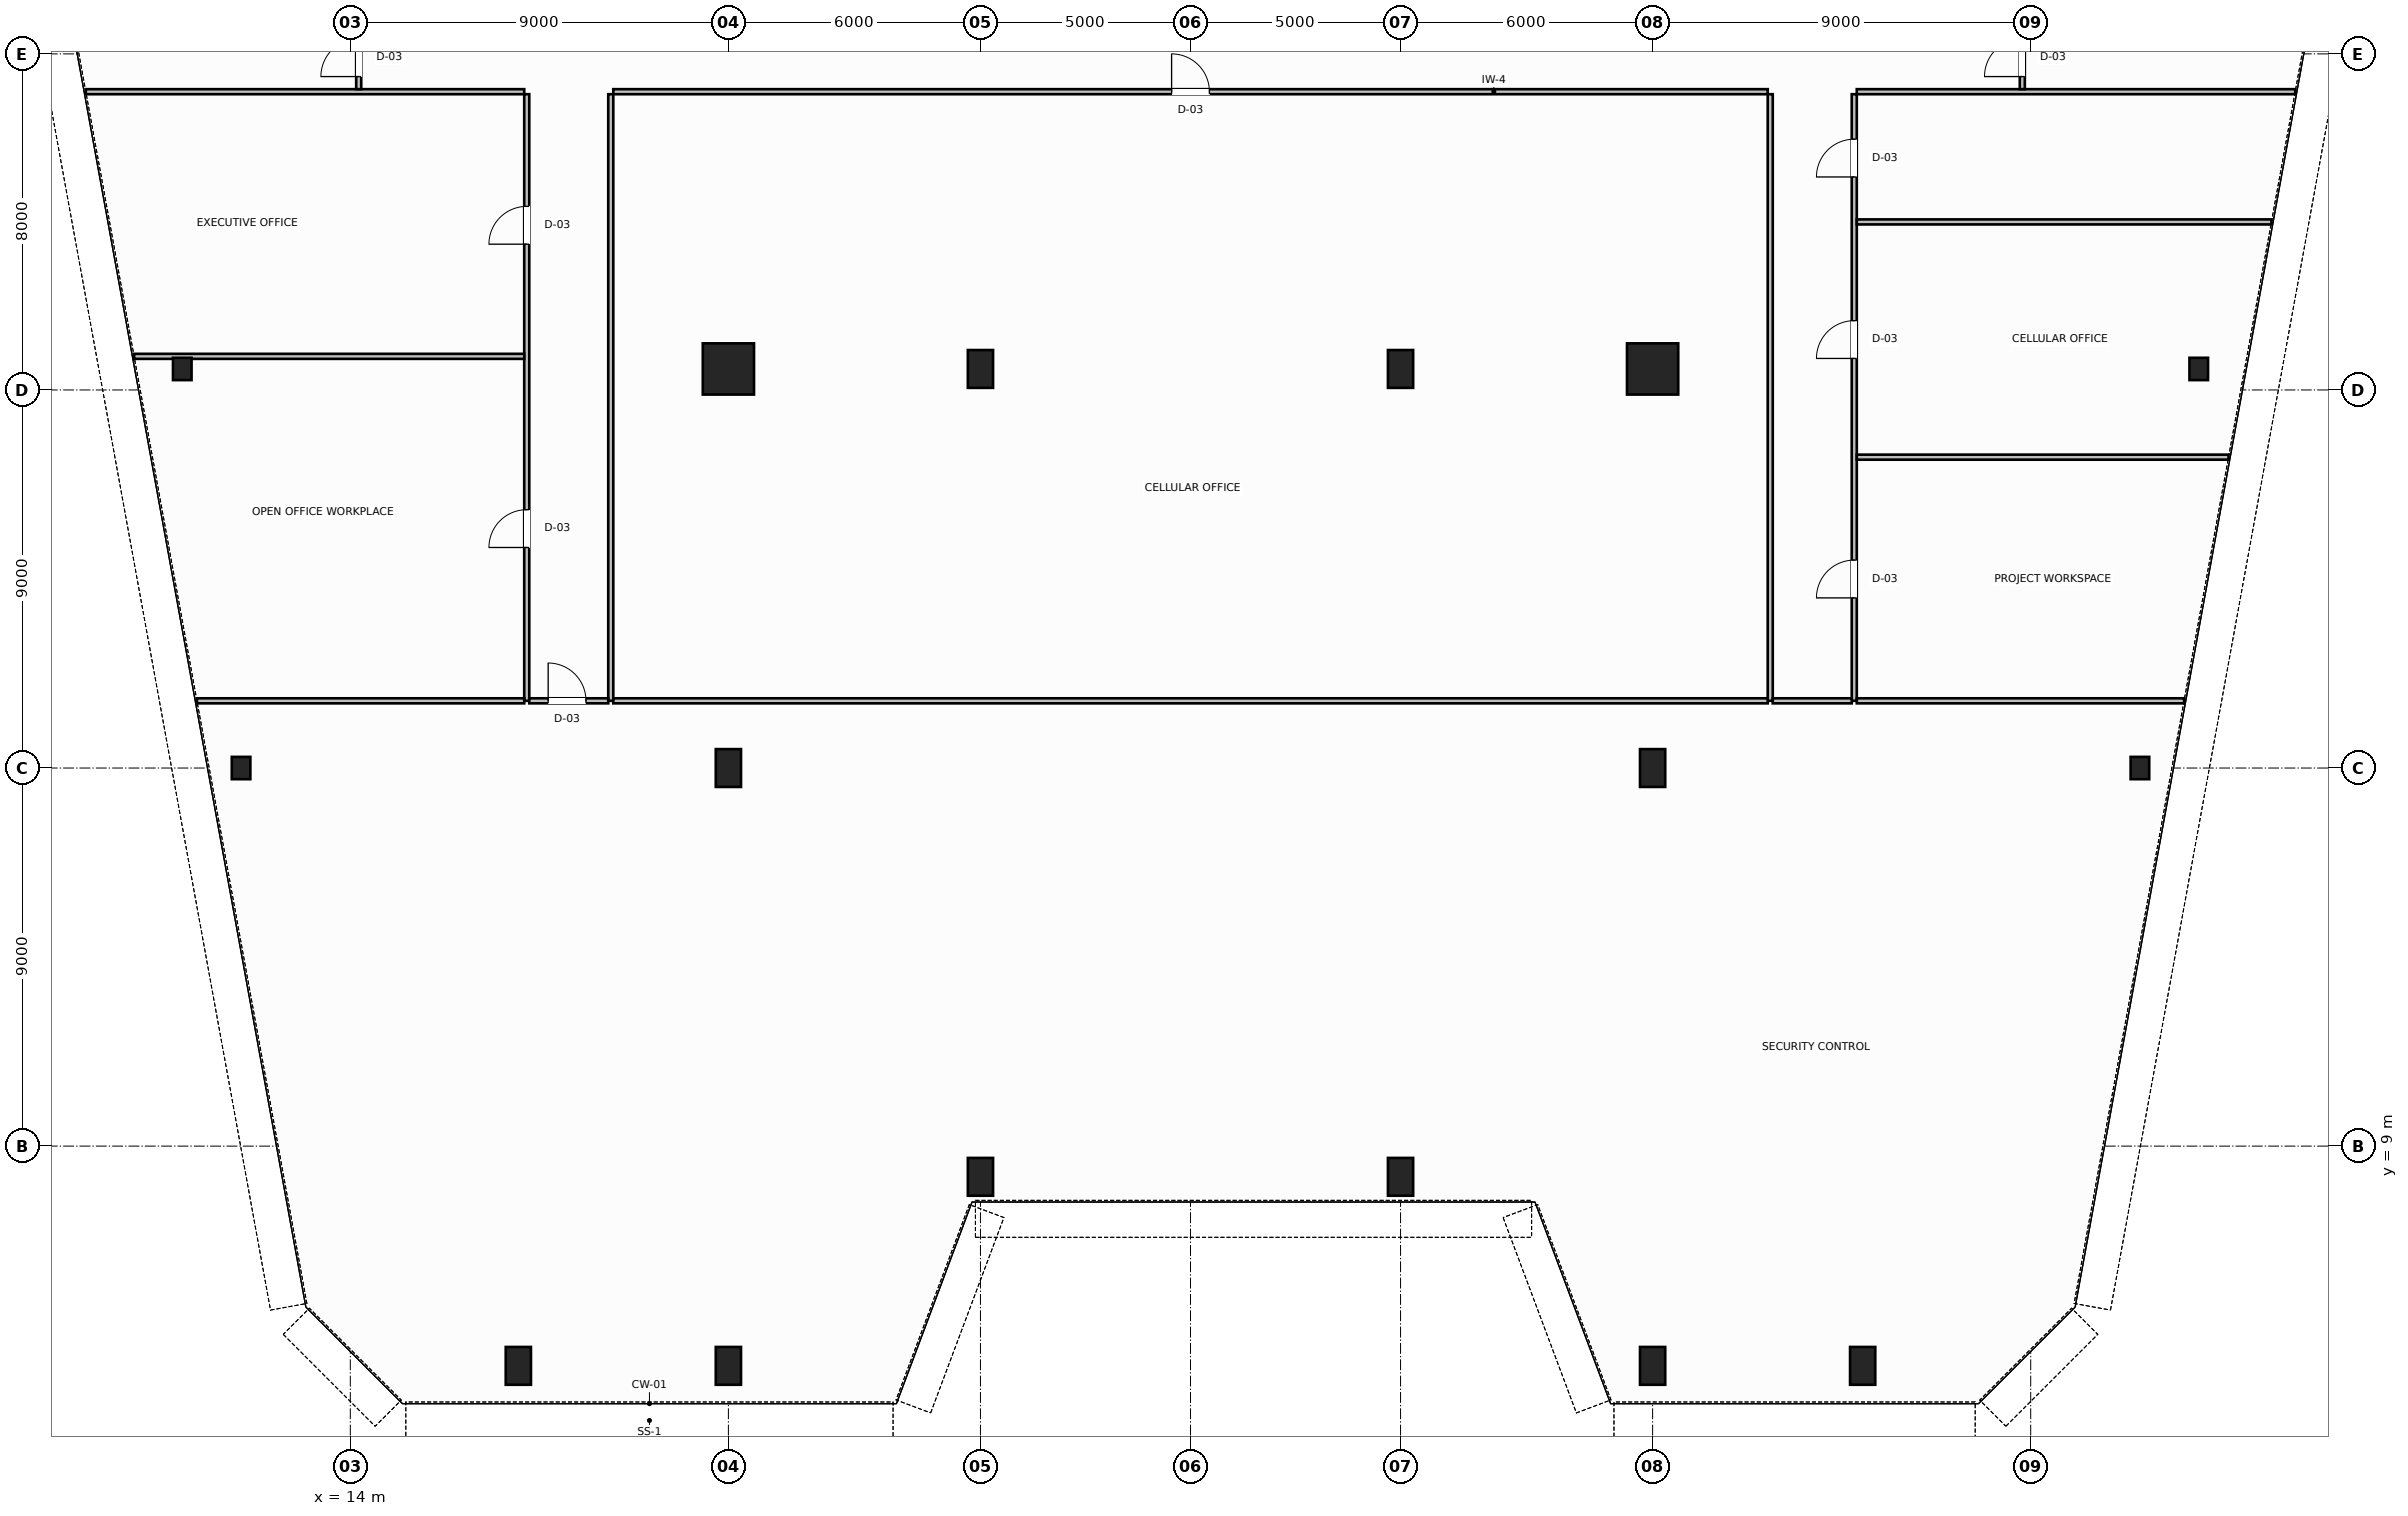
"""IFC4 building model, lengths in metres.
Left out: names, types, materials, properties, quantities, classifications, styles, units other than length and angle.
Written with IfcOpenShell. Run it as: python <this file> out.ifc"""

import sys

from ifc_helpers import new_model, si_unit, direction, frame, frame_2d, origin, origin_2d, place, context, subcontext, project, spatial, rectangle, hollow_rectangle, hollow_circle, i_section, extrude, source, transform, mapped, element, fill, save


model = new_model("IFC4")
c1 = context("Model", 3, precision=1e-05, world=origin(), true_north=direction((0.0, 1.0)))
c2 = subcontext(c1, "Body", "Model", "MODEL_VIEW")
j1 = project(units=[si_unit("LENGTHUNIT", "METRE"), si_unit("PLANEANGLEUNIT", "RADIAN")], contexts=[c1])
p1 = place(None, origin())
s1 = spatial("IfcSite", under=j1, at=p1, CompositionType="ELEMENT")
p2 = place(p1, origin())
s2 = spatial("IfcBuilding", under=s1, at=p2, CompositionType="ELEMENT")
p3 = place(p2, frame((0.0, 0.0, 64.4)))
s3 = spatial("IfcBuildingStorey", under=s2, at=p3, CompositionType="ELEMENT", Elevation=64.4)
m1 = source(origin(), c2, "Body", "SweptSolid", [
    extrude(i_section(OverallWidth=0.442, OverallDepth=0.531, WebThickness=0.065, FlangeThickness=0.076, FilletRadius=0.015, at=origin_2d()), origin(), (0.0, 0.0, 1.0), 3.8),
])
for number, where, z_axis, x_axis in (
    (1, (10.0, 27.5, 0.0), (0.0, 0.0, 1.0), (1.0, 0.0, 0.0)),
    (2, (11.4, 18.0, 0.0), (0.0, 0.0, 1.0), (1.0, 0.0, 0.0)),
    (3, (58.0, 27.5, 0.0), (0.0, 0.0, 1.0), (1.0, 0.0, 0.0)),
    (4, (56.6, 18.0, 0.0), (0.0, 0.0, 1.0), (1.0, 0.0, 0.0)),
):
    element("IfcColumn", number, at=place(p3, frame(where, z_axis=z_axis, x_axis=x_axis)), inside=s3, PredefinedType="COLUMN", context=c2, shape_type="MappedRepresentation", body=[
        mapped(m1, transform((0.0, 0.0, 0.0), scale=1.0)),
    ])
m2 = source(origin(), c2, "Body", "SweptSolid", [
    extrude(hollow_circle(Radius=0.61, WallThickness=0.05, at=origin_2d()), origin(), (0.0, 0.0, 1.0), 3.8),
])
p4 = place(p3, frame((23.0, 27.5, 0.0), z_axis=(0.0, 0.0, 1.0), x_axis=(1.0, 0.0, 0.0)))
e5 = element("IfcColumn", 5, at=p4, inside=s3, PredefinedType="COLUMN", context=c2, shape_type="MappedRepresentation", body=[
    mapped(m2, transform((0.0, 0.0, 0.0), scale=1.0)),
])
m3 = source(origin(), c2, "Body", "SweptSolid", [
    extrude(hollow_rectangle(XDim=0.6, YDim=0.9, WallThickness=0.04, InnerFilletRadius=0.04, OuterFilletRadius=0.08, at=origin_2d()), origin(), (0.0, 0.0, 1.0), 3.8),
])
for number, where, z_axis, x_axis in (
    (6, (29.0, 27.5, 0.0), (0.0, 0.0, 1.0), (1.0, 0.0, 0.0)),
    (7, (39.0, 27.5, 0.0), (0.0, 0.0, 1.0), (1.0, 0.0, 0.0)),
):
    element("IfcColumn", number, at=place(p3, frame(where, z_axis=z_axis, x_axis=x_axis)), inside=s3, PredefinedType="COLUMN", context=c2, shape_type="MappedRepresentation", body=[
        mapped(m3, transform((0.0, 0.0, 0.0), scale=1.0)),
    ])
p5 = place(p3, frame((45.0, 27.5, 0.0), z_axis=(0.0, 0.0, 1.0), x_axis=(1.0, 0.0, 0.0)))
e8 = element("IfcColumn", 8, at=p5, inside=s3, PredefinedType="COLUMN", context=c2, shape_type="MappedRepresentation", body=[
    mapped(m2, transform((0.0, 0.0, 0.0), scale=1.0)),
])
for number, where, z_axis, x_axis in (
    (9, (23.0, 18.0, 0.0), (0.0, 0.0, 1.0), (1.0, 0.0, 0.0)),
    (10, (45.0, 18.0, 0.0), (0.0, 0.0, 1.0), (1.0, 0.0, 0.0)),
):
    element("IfcColumn", number, at=place(p3, frame(where, z_axis=z_axis, x_axis=x_axis)), inside=s3, PredefinedType="COLUMN", context=c2, shape_type="MappedRepresentation", body=[
        mapped(m3, transform((0.0, 0.0, 0.0), scale=1.0)),
    ])
m4 = source(origin(), c2, "Body", "SweptSolid", [
    extrude(hollow_rectangle(XDim=0.6, YDim=0.9, WallThickness=0.04, InnerFilletRadius=0.04, OuterFilletRadius=0.08, at=origin_2d()), origin(), (0.0, 0.0, 1.0), 3.744),
])
for number, where, z_axis, x_axis in (
    (11, (18.0, 3.769, 0.032), (0.0, 0.064, 0.998), (-1.0, 0.0, 0.0)),
    (12, (23.0, 3.769, 0.032), (0.0, 0.064, 0.998), (-1.0, 0.0, 0.0)),
    (13, (29.0, 8.269, 0.032), (0.0, 0.064, 0.998), (-1.0, 0.0, 0.0)),
    (14, (39.0, 8.269, 0.032), (0.0, 0.064, 0.998), (-1.0, 0.0, 0.0)),
    (15, (45.0, 3.769, 0.032), (0.0, 0.064, 0.998), (-1.0, 0.0, 0.0)),
    (16, (50.0, 3.769, 0.032), (0.0, 0.064, 0.998), (-1.0, 0.0, 0.0)),
):
    element("IfcColumn", number, at=place(p3, frame(where, z_axis=z_axis, x_axis=x_axis)), inside=s3, PredefinedType="COLUMN", context=c2, shape_type="MappedRepresentation", body=[
        mapped(m4, transform((0.0, 0.0, 0.0), scale=1.0)),
    ])
p6 = place(p3, frame((20.26, 34.1, 0.0), z_axis=(0.0, 0.0, 1.0), x_axis=(1.0, 0.0, 0.0)))
e17 = element("IfcWall", 17, at=p6, inside=s3, PredefinedType="PARTITIONING", context=c2, shape_type="SweptSolid", body=[
    extrude(rectangle(XDim=27.48, YDim=0.12, at=frame_2d((13.74, 0.0))), origin(), (0.0, 0.0, 1.0), 3.58),
])
p7 = place(p6, frame((13.29, 0.0, 0.0)))
e18 = element("IfcOpeningElement", 18, at=p7, cuts=e17, PredefinedType="OPENING", context=c2, shape_type="SweptSolid", body=[
    extrude(rectangle(XDim=0.9, YDim=2.15, at=frame_2d((0.45, 1.075))), frame((0.0, 0.07, 0.0), z_axis=(0.0, -1.0, 0.0), x_axis=(1.0, 0.0, 0.0)), (0.0, 0.0, 1.0), 0.14),
])
for number, where, z_axis, x_axis in (
    (19, (7.704, 34.1, 0.0), (0.0, 0.0, 1.0), (1.0, 0.0, 0.0)),
    (20, (49.86, 34.1, 0.0), (0.0, 0.0, 1.0), (1.0, 0.0, 0.0)),
):
    element("IfcWall", number, at=place(p3, frame(where, z_axis=z_axis, x_axis=x_axis)), inside=s3, PredefinedType="PARTITIONING", context=c2, shape_type="SweptSolid", body=[
        extrude(rectangle(XDim=10.436, YDim=0.12, at=frame_2d((5.218, 0.0))), origin(), (0.0, 0.0, 1.0), 3.58),
    ])
p8 = place(p3, frame((14.2, 34.16, 0.0), z_axis=(0.0, 0.0, 1.0), x_axis=(0.0, 1.0, 0.0)))
e21 = element("IfcWall", 21, at=p8, inside=s3, PredefinedType="PARTITIONING", context=c2, shape_type="SweptSolid", body=[
    extrude(rectangle(XDim=2.28, YDim=0.12, at=frame_2d((1.14, 0.0))), origin(), (0.0, 0.0, 1.0), 3.58),
])
p9 = place(p8, frame((0.3, 0.0, 0.0)))
e22 = element("IfcOpeningElement", 22, at=p9, cuts=e21, PredefinedType="OPENING", context=c2, shape_type="SweptSolid", body=[
    extrude(rectangle(XDim=0.9, YDim=2.15, at=frame_2d((0.45, 1.075))), frame((0.0, 0.07, 0.0), z_axis=(0.0, -1.0, 0.0), x_axis=(1.0, 0.0, 0.0)), (0.0, 0.0, 1.0), 0.14),
])
p10 = place(p3, frame((53.8, 34.16, 0.0), z_axis=(0.0, 0.0, 1.0), x_axis=(0.0, 1.0, 0.0)))
e23 = element("IfcWall", 23, at=p10, inside=s3, PredefinedType="PARTITIONING", context=c2, shape_type="SweptSolid", body=[
    extrude(rectangle(XDim=2.28, YDim=0.12, at=frame_2d((1.14, 0.0))), origin(), (0.0, 0.0, 1.0), 3.58),
])
p11 = place(p10, frame((0.3, 0.0, 0.0)))
e24 = element("IfcOpeningElement", 24, at=p11, cuts=e23, PredefinedType="OPENING", context=c2, shape_type="SweptSolid", body=[
    extrude(rectangle(XDim=0.9, YDim=2.15, at=frame_2d((0.45, 1.075))), frame((0.0, 0.07, 0.0), z_axis=(0.0, -1.0, 0.0), x_axis=(1.0, 0.0, 0.0)), (0.0, 0.0, 1.0), 0.14),
])
p12 = place(p3, frame((18.2, 19.6, 0.0), z_axis=(0.0, 0.0, 1.0), x_axis=(0.0, 1.0, 0.0)))
e25 = element("IfcWall", 25, at=p12, inside=s3, PredefinedType="PARTITIONING", context=c2, shape_type="SweptSolid", body=[
    extrude(rectangle(XDim=14.44, YDim=0.12, at=frame_2d((7.22, 0.0))), origin(), (0.0, 0.0, 1.0), 3.58),
])
p13 = place(p12, frame((3.65, 0.0, 0.0)))
e26 = element("IfcOpeningElement", 26, at=p13, cuts=e25, PredefinedType="OPENING", context=c2, shape_type="SweptSolid", body=[
    extrude(rectangle(XDim=0.9, YDim=2.15, at=frame_2d((0.45, 1.075))), frame((0.0, 0.07, 0.0), z_axis=(0.0, -1.0, 0.0), x_axis=(1.0, 0.0, 0.0)), (0.0, 0.0, 1.0), 0.14),
])
p14 = place(p12, frame((10.87, 0.0, 0.0)))
e27 = element("IfcOpeningElement", 27, at=p14, cuts=e25, PredefinedType="OPENING", context=c2, shape_type="SweptSolid", body=[
    extrude(rectangle(XDim=0.9, YDim=2.15, at=frame_2d((0.45, 1.075))), frame((0.0, 0.07, 0.0), z_axis=(0.0, -1.0, 0.0), x_axis=(1.0, 0.0, 0.0)), (0.0, 0.0, 1.0), 0.14),
])
for number, where, z_axis, x_axis in (
    (28, (20.2, 19.6, 0.0), (0.0, 0.0, 1.0), (0.0, 1.0, 0.0)),
    (29, (47.8, 19.6, 0.0), (0.0, 0.0, 1.0), (0.0, 1.0, 0.0)),
):
    element("IfcWall", number, at=place(p3, frame(where, z_axis=z_axis, x_axis=x_axis)), inside=s3, PredefinedType="PARTITIONING", context=c2, shape_type="SweptSolid", body=[
        extrude(rectangle(XDim=14.44, YDim=0.12, at=frame_2d((7.22, 0.0))), origin(), (0.0, 0.0, 1.0), 3.58),
    ])
p15 = place(p3, frame((49.8, 19.6, 0.0), z_axis=(0.0, 0.0, 1.0), x_axis=(0.0, 1.0, 0.0)))
e30 = element("IfcWall", 30, at=p15, inside=s3, PredefinedType="PARTITIONING", context=c2, shape_type="SweptSolid", body=[
    extrude(rectangle(XDim=14.44, YDim=0.12, at=frame_2d((7.22, 0.0))), origin(), (0.0, 0.0, 1.0), 3.58),
])
p16 = place(p15, frame((2.45, 0.0, 0.0)))
e31 = element("IfcOpeningElement", 31, at=p16, cuts=e30, PredefinedType="OPENING", context=c2, shape_type="SweptSolid", body=[
    extrude(rectangle(XDim=0.9, YDim=2.15, at=frame_2d((0.45, 1.075))), frame((0.0, 0.07, 0.0), z_axis=(0.0, -1.0, 0.0), x_axis=(1.0, 0.0, 0.0)), (0.0, 0.0, 1.0), 0.14),
])
p17 = place(p15, frame((8.15, 0.0, 0.0)))
e32 = element("IfcOpeningElement", 32, at=p17, cuts=e30, PredefinedType="OPENING", context=c2, shape_type="SweptSolid", body=[
    extrude(rectangle(XDim=0.9, YDim=2.15, at=frame_2d((0.45, 1.075))), frame((0.0, 0.07, 0.0), z_axis=(0.0, -1.0, 0.0), x_axis=(1.0, 0.0, 0.0)), (0.0, 0.0, 1.0), 0.14),
])
p18 = place(p15, frame((12.47, 0.0, 0.0)))
e33 = element("IfcOpeningElement", 33, at=p18, cuts=e30, PredefinedType="OPENING", context=c2, shape_type="SweptSolid", body=[
    extrude(rectangle(XDim=0.9, YDim=2.15, at=frame_2d((0.45, 1.075))), frame((0.0, 0.07, 0.0), z_axis=(0.0, -1.0, 0.0), x_axis=(1.0, 0.0, 0.0)), (0.0, 0.0, 1.0), 0.14),
])
p19 = place(p3, frame((18.26, 19.6, 0.0), z_axis=(0.0, 0.0, 1.0), x_axis=(1.0, 0.0, 0.0)))
e34 = element("IfcWall", 34, at=p19, inside=s3, PredefinedType="PARTITIONING", context=c2, shape_type="SweptSolid", body=[
    extrude(rectangle(XDim=1.88, YDim=0.12, at=frame_2d((0.94, 0.0))), origin(), (0.0, 0.0, 1.0), 3.58),
])
p20 = place(p19, frame((0.45, 0.0, 0.0)))
e35 = element("IfcOpeningElement", 35, at=p20, cuts=e34, PredefinedType="OPENING", context=c2, shape_type="SweptSolid", body=[
    extrude(rectangle(XDim=0.9, YDim=2.15, at=frame_2d((0.45, 1.075))), frame((0.0, 0.07, 0.0), z_axis=(0.0, -1.0, 0.0), x_axis=(1.0, 0.0, 0.0)), (0.0, 0.0, 1.0), 0.14),
])
p21 = place(p3, frame((47.86, 19.6, 0.0), z_axis=(0.0, 0.0, 1.0), x_axis=(1.0, 0.0, 0.0)))
e36 = element("IfcWall", 36, at=p21, inside=s3, PredefinedType="PARTITIONING", context=c2, shape_type="SweptSolid", body=[
    extrude(rectangle(XDim=1.88, YDim=0.12, at=frame_2d((0.94, 0.0))), origin(), (0.0, 0.0, 1.0), 3.58),
])
p22 = place(p3, frame((10.349, 19.6, 0.0), z_axis=(0.0, 0.0, 1.0), x_axis=(1.0, 0.0, 0.0)))
e37 = element("IfcWall", 37, at=p22, inside=s3, PredefinedType="PARTITIONING", context=c2, shape_type="SweptSolid", body=[
    extrude(rectangle(XDim=7.791, YDim=0.12, at=frame_2d((3.896, 0.0))), origin(), (0.0, 0.0, 1.0), 3.58),
])
p23 = place(p3, frame((8.853, 27.8, 0.0), z_axis=(0.0, 0.0, 1.0), x_axis=(1.0, 0.0, 0.0)))
e38 = element("IfcWall", 38, at=p23, inside=s3, PredefinedType="PARTITIONING", context=c2, shape_type="SweptSolid", body=[
    extrude(rectangle(XDim=9.287, YDim=0.12, at=frame_2d((4.644, 0.0))), origin(), (0.0, 0.0, 1.0), 3.58),
])
p24 = place(p3, frame((49.86, 19.6, 0.0), z_axis=(0.0, 0.0, 1.0), x_axis=(1.0, 0.0, 0.0)))
e39 = element("IfcWall", 39, at=p24, inside=s3, PredefinedType="PARTITIONING", context=c2, shape_type="SweptSolid", body=[
    extrude(rectangle(XDim=7.791, YDim=0.12, at=frame_2d((3.896, 0.0))), origin(), (0.0, 0.0, 1.0), 3.58),
])
p25 = place(p3, frame((49.86, 25.4, 0.0), z_axis=(0.0, 0.0, 1.0), x_axis=(1.0, 0.0, 0.0)))
e40 = element("IfcWall", 40, at=p25, inside=s3, PredefinedType="PARTITIONING", context=c2, shape_type="SweptSolid", body=[
    extrude(rectangle(XDim=8.849, YDim=0.12, at=frame_2d((4.425, 0.0))), origin(), (0.0, 0.0, 1.0), 3.58),
])
p26 = place(p3, frame((49.86, 31.0, 0.0), z_axis=(0.0, 0.0, 1.0), x_axis=(1.0, 0.0, 0.0)))
e41 = element("IfcWall", 41, at=p26, inside=s3, PredefinedType="PARTITIONING", context=c2, shape_type="SweptSolid", body=[
    extrude(rectangle(XDim=9.871, YDim=0.12, at=frame_2d((4.936, 0.0))), origin(), (0.0, 0.0, 1.0), 3.07),
])
p27 = place(p3, frame((20.26, 19.6, 0.0), z_axis=(0.0, 0.0, 1.0), x_axis=(1.0, 0.0, 0.0)))
e42 = element("IfcWall", 42, at=p27, inside=s3, PredefinedType="PARTITIONING", context=c2, shape_type="SweptSolid", body=[
    extrude(rectangle(XDim=27.48, YDim=0.12, at=frame_2d((13.74, 0.0))), origin(), (0.0, 0.0, 1.0), 3.58),
])
m5 = source(origin(), c2, "Body", "SweptSolid", [
    extrude(rectangle(XDim=0.9, YDim=2.15, at=frame_2d((0.45, 1.075))), frame((0.0, 0.025, 0.0), z_axis=(0.0, -1.0, 0.0), x_axis=(1.0, 0.0, 0.0)), (0.0, 0.0, 1.0), 0.05),
])
p28 = place(p9, origin())
e43 = element("IfcDoor", 43, at=p28, inside=s3, OperationType="SINGLE_SWING_LEFT", PredefinedType="DOOR", context=c2, shape_type="MappedRepresentation", body=[
    mapped(m5, transform((0.0, 0.0, 0.0), scale=1.0)),
])
fill(e22, e43)
p29 = place(p11, origin())
e44 = element("IfcDoor", 44, at=p29, inside=s3, OperationType="SINGLE_SWING_RIGHT", PredefinedType="DOOR", context=c2, shape_type="MappedRepresentation", body=[
    mapped(m5, transform((0.0, 0.0, 0.0), scale=1.0)),
])
fill(e24, e44)
p30 = place(p13, origin())
e45 = element("IfcDoor", 45, at=p30, inside=s3, OperationType="SINGLE_SWING_LEFT", PredefinedType="DOOR", context=c2, shape_type="MappedRepresentation", body=[
    mapped(m5, transform((0.0, 0.0, 0.0), scale=1.0)),
])
fill(e26, e45)
p31 = place(p14, origin())
e46 = element("IfcDoor", 46, at=p31, inside=s3, OperationType="SINGLE_SWING_RIGHT", PredefinedType="DOOR", context=c2, shape_type="MappedRepresentation", body=[
    mapped(m5, transform((0.0, 0.0, 0.0), scale=1.0)),
])
fill(e27, e46)
p32 = place(p16, origin())
e47 = element("IfcDoor", 47, at=p32, inside=s3, OperationType="SINGLE_SWING_RIGHT", PredefinedType="DOOR", context=c2, shape_type="MappedRepresentation", body=[
    mapped(m5, transform((0.0, 0.0, 0.0), scale=1.0)),
])
fill(e31, e47)
p33 = place(p17, origin())
e48 = element("IfcDoor", 48, at=p33, inside=s3, OperationType="SINGLE_SWING_LEFT", PredefinedType="DOOR", context=c2, shape_type="MappedRepresentation", body=[
    mapped(m5, transform((0.0, 0.0, 0.0), scale=1.0)),
])
fill(e32, e48)
p34 = place(p18, origin())
e49 = element("IfcDoor", 49, at=p34, inside=s3, OperationType="SINGLE_SWING_RIGHT", PredefinedType="DOOR", context=c2, shape_type="MappedRepresentation", body=[
    mapped(m5, transform((0.0, 0.0, 0.0), scale=1.0)),
])
fill(e33, e49)
p35 = place(p7, origin())
e50 = element("IfcDoor", 50, at=p35, inside=s3, OperationType="SINGLE_SWING_LEFT", PredefinedType="DOOR", context=c2, shape_type="MappedRepresentation", body=[
    mapped(m5, transform((0.0, 0.0, 0.0), scale=1.0)),
])
fill(e18, e50)
p36 = place(p20, origin())
e51 = element("IfcDoor", 51, at=p36, inside=s3, OperationType="SINGLE_SWING_LEFT", PredefinedType="DOOR", context=c2, shape_type="MappedRepresentation", body=[
    mapped(m5, transform((0.0, 0.0, 0.0), scale=1.0)),
])
fill(e35, e51)
save(model, sys.argv[1])
